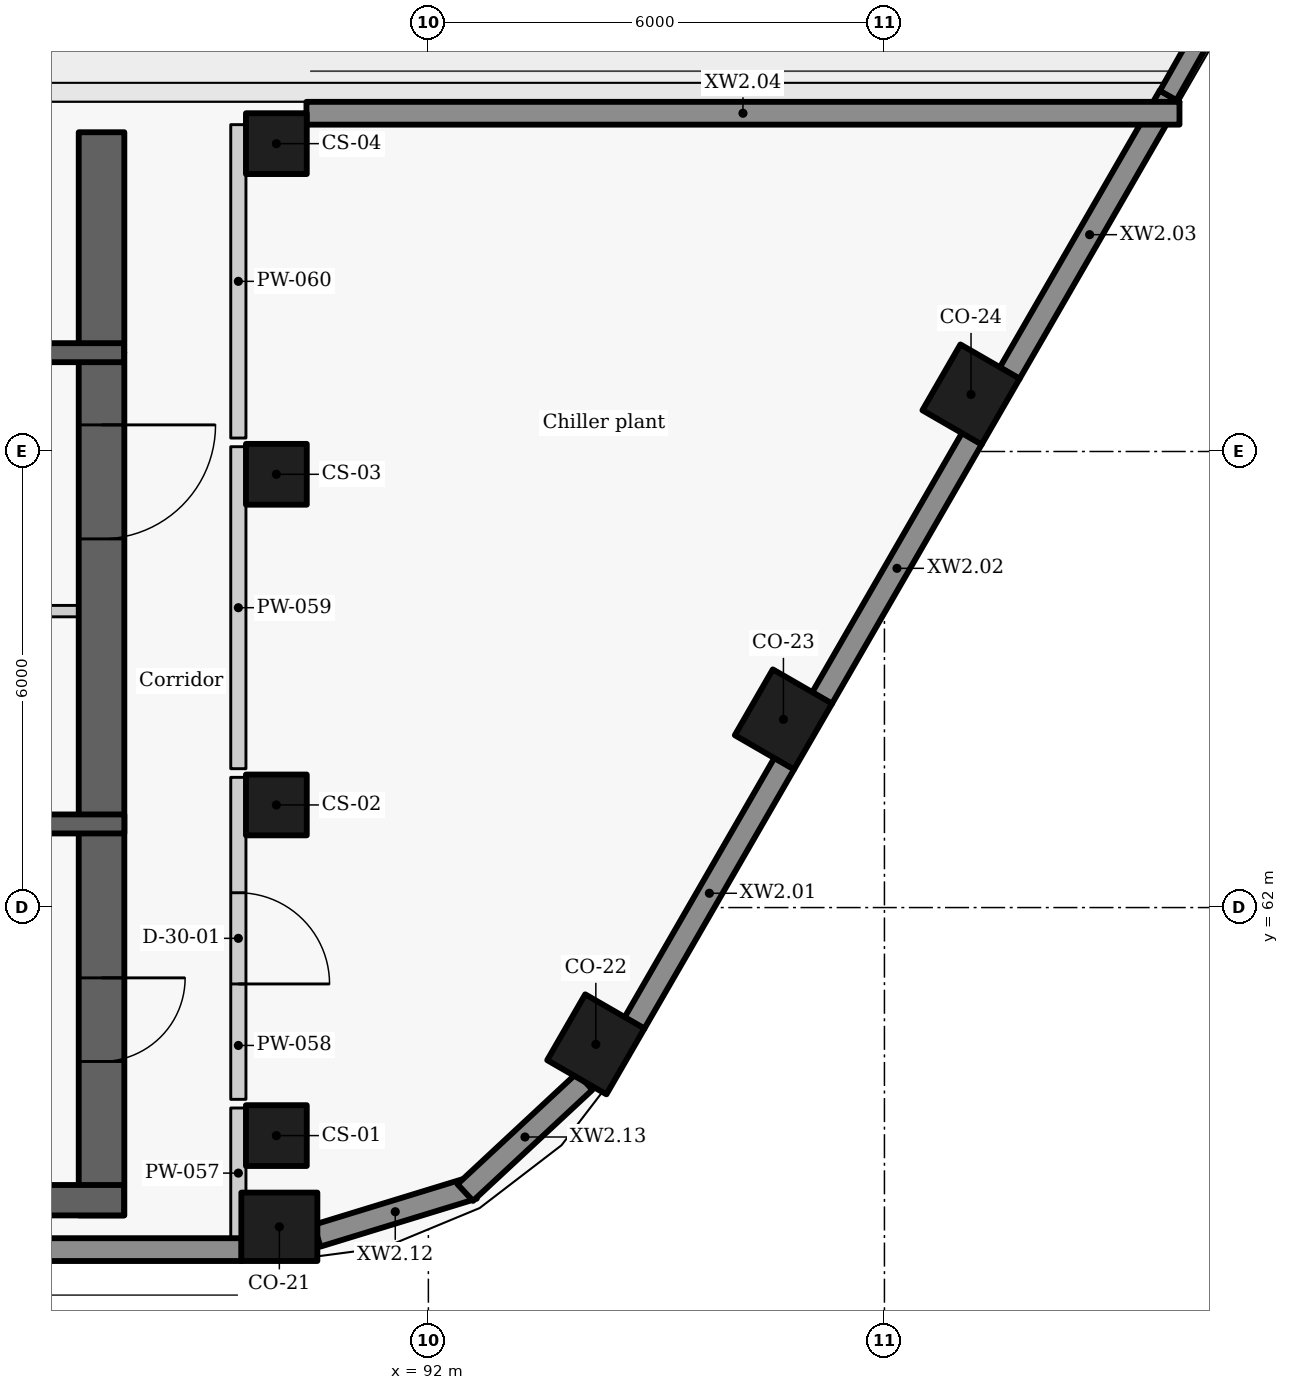
"""IFC4 building model, lengths in metres.
Left out: names, types, materials, properties, quantities, classifications, styles, units other than length and angle.
Written with IfcOpenShell. Run it as: python <this file> out.ifc"""

import sys

from ifc_helpers import new_model, si_unit, direction, frame, frame_2d, origin, origin_2d, place, context, subcontext, project, spatial, rectangle, extrude, element, fill, save


model = new_model("IFC4")
c1 = context("Model", 3, precision=1e-05, world=origin(), true_north=direction((0.0, 1.0)))
c2 = subcontext(c1, "Body", "Model", "MODEL_VIEW")
j1 = project(units=[si_unit("LENGTHUNIT", "METRE"), si_unit("PLANEANGLEUNIT", "RADIAN")], contexts=[c1])
p1 = place(None, origin())
s1 = spatial("IfcSite", under=j1, at=p1, CompositionType="ELEMENT")
p2 = place(p1, origin())
s2 = spatial("IfcBuilding", under=s1, at=p2, CompositionType="ELEMENT")
p3 = place(p2, frame((0.0, 0.0, 276.0)))
s3 = spatial("IfcBuildingStorey", under=s2, at=p3, CompositionType="ELEMENT", Elevation=276.0)
for number, where, z_axis, x_axis in (
    (1, (90.04, 57.8, 0.0), (0.0, 0.0, 1.0), (1.0, 0.0, 0.0)),
    (2, (94.203, 60.2, 0.0), (0.0, 0.0, 1.0), (0.5, 0.866, 0.0)),
    (3, (96.671, 64.475, 0.0), (0.0, 0.0, 1.0), (0.5, 0.866, 0.0)),
    (4, (99.139, 68.75, 0.0), (0.0, 0.0, 1.0), (0.5, 0.866, 0.0)),
):
    element("IfcColumn", number, at=place(p3, frame(where, z_axis=z_axis, x_axis=x_axis)), inside=s3, PredefinedType="COLUMN", context=c2, shape_type="SweptSolid", body=[
        extrude(rectangle(XDim=1.0, YDim=0.9, at=origin_2d()), origin(), (0.0, 0.0, 1.0), 3.6),
    ])
for number, where, z_axis, x_axis in (
    (5, (90.0, 59.0, 0.0), (0.0, 0.0, 1.0), (0.0, 1.0, 0.0)),
    (6, (90.0, 63.35, 0.0), (0.0, 0.0, 1.0), (0.0, 1.0, 0.0)),
    (7, (90.0, 67.7, 0.0), (0.0, 0.0, 1.0), (0.0, 1.0, 0.0)),
    (8, (90.0, 72.05, 0.0), (0.0, 0.0, 1.0), (0.0, 1.0, 0.0)),
):
    element("IfcColumn", number, at=place(p3, frame(where, z_axis=z_axis, x_axis=x_axis)), inside=s3, PredefinedType="COLUMN", context=c2, shape_type="SweptSolid", body=[
        extrude(rectangle(XDim=0.8, YDim=0.8, at=origin_2d()), origin(), (0.0, 0.0, 1.0), 3.6),
    ])
for number, where, z_axis, x_axis in (
    (9, (94.711, 60.48, 0.0), (0.0, 0.0, 1.0), (0.5, 0.866, 0.0)),
    (10, (97.179, 64.755, 0.0), (0.0, 0.0, 1.0), (0.5, 0.866, 0.0)),
):
    element("IfcWall", number, at=place(p3, frame(where, z_axis=z_axis, x_axis=x_axis)), inside=s3, PredefinedType="SOLIDWALL", context=c2, shape_type="SweptSolid", body=[
        extrude(rectangle(XDim=3.944, YDim=0.3, at=frame_2d((1.972, 0.0))), origin(), (0.0, 0.0, 1.0), 2.725),
    ])
p4 = place(p3, frame((99.647, 69.03, 0.0), z_axis=(0.0, 0.0, 1.0), x_axis=(0.499981865284, 0.866035873614, 0.0)))
e11 = element("IfcWall", 11, at=p4, inside=s3, PredefinedType="SOLIDWALL", context=c2, shape_type="SweptSolid", body=[
    extrude(rectangle(XDim=4.209, YDim=0.3, at=frame_2d((2.104, 0.0))), origin(), (0.0, 0.0, 1.0), 2.725),
])
p5 = place(p3, frame((101.882, 72.45, 0.0), z_axis=(0.0, 0.0, 1.0), x_axis=(-1.0, 0.0, 0.0)))
e12 = element("IfcWall", 12, at=p5, inside=s3, PredefinedType="SOLIDWALL", context=c2, shape_type="SweptSolid", body=[
    extrude(rectangle(XDim=11.486, YDim=0.3, at=frame_2d((5.743, 0.0))), origin(), (0.0, 0.0, 1.0), 2.725),
])
p6 = place(p3, frame((70.451, 57.5, 0.0), z_axis=(0.0, 0.0, 1.0), x_axis=(1.0, 0.0, 0.0)))
e13 = element("IfcWall", 13, at=p6, inside=s3, PredefinedType="SOLIDWALL", context=c2, shape_type="SweptSolid", body=[
    extrude(rectangle(XDim=19.093, YDim=0.3, at=frame_2d((9.546, 0.0))), origin(), (0.0, 0.0, 1.0), 2.725),
])
p7 = place(p3, frame((90.536, 57.683, 0.0), z_axis=(0.0, 0.0, 1.0), x_axis=(0.956094906027, 0.293057213987, 0.0)))
e14 = element("IfcWall", 14, at=p7, inside=s3, PredefinedType="SOLIDWALL", context=c2, shape_type="SweptSolid", body=[
    extrude(rectangle(XDim=2.152, YDim=0.3, at=frame_2d((1.076, 0.0))), origin(), (0.0, 0.0, 1.0), 2.725),
])
p8 = place(p3, frame((92.485, 58.25, 0.0), z_axis=(0.0, 0.0, 1.0), x_axis=(0.732075899412, 0.681223074697, 0.0)))
e15 = element("IfcWall", 15, at=p8, inside=s3, PredefinedType="SOLIDWALL", context=c2, shape_type="SweptSolid", body=[
    extrude(rectangle(XDim=2.146, YDim=0.3, at=frame_2d((1.073, 0.0))), origin(), (0.0, 0.0, 1.0), 2.725),
])
p9 = place(p3, frame((101.732, 72.684, 0.0), z_axis=(0.0, 0.0, 1.0), x_axis=(0.492736734633, 0.870178435922, 0.0)))
e16 = element("IfcWall", 16, at=p9, inside=s3, PredefinedType="PARAPET", context=c2, shape_type="SweptSolid", body=[
    extrude(rectangle(XDim=5.918, YDim=0.25, at=frame_2d((2.959, 0.0))), origin(), (0.0, 0.0, 1.0), 1.1),
])
p10 = place(p3, frame((88.0, 65.9, 0.0), z_axis=(0.0, 0.0, 1.0), x_axis=(-1.0, 0.0, 0.0)))
e17 = element("IfcWall", 17, at=p10, inside=s3, PredefinedType="PARTITIONING", context=c2, shape_type="SweptSolid", body=[
    extrude(rectangle(XDim=2.603, YDim=0.15, at=frame_2d((1.302, 0.0))), origin(), (0.0, 0.0, 1.0), 3.325),
])
p11 = place(p10, frame((1.175, 0.0, 0.0)))
e18 = element("IfcOpeningElement", 18, at=p11, cuts=e17, PredefinedType="OPENING", context=c2, shape_type="SweptSolid", body=[
    extrude(rectangle(XDim=0.9, YDim=2.1, at=frame_2d((0.45, 1.05))), frame((0.0, 0.085, 0.0), z_axis=(0.0, -1.0, 0.0), x_axis=(1.0, 0.0, 0.0)), (0.0, 0.0, 1.0), 0.17),
])
p12 = place(p3, frame((87.7, 69.3, -0.275), z_axis=(0.0, 0.0, 1.0), x_axis=(0.0, -1.0, 0.0)))
e19 = element("IfcWall", 19, at=p12, inside=s3, PredefinedType="SHEAR", context=c2, shape_type="SweptSolid", body=[
    extrude(rectangle(XDim=11.35, YDim=0.6, at=frame_2d((5.675, 0.0))), origin(), (0.0, 0.0, 1.0), 3.6),
])
p13 = place(p12, frame((0.95, 0.0, 0.275)))
e20 = element("IfcOpeningElement", 20, at=p13, cuts=e19, PredefinedType="OPENING", context=c2, shape_type="SweptSolid", body=[
    extrude(rectangle(XDim=1.5, YDim=2.1, at=frame_2d((0.75, 1.05))), frame((0.0, 0.31, 0.0), z_axis=(0.0, -1.0, 0.0), x_axis=(1.0, 0.0, 0.0)), (0.0, 0.0, 1.0), 0.62),
])
p14 = place(p12, frame((8.225, 0.0, 0.275)))
e21 = element("IfcOpeningElement", 21, at=p14, cuts=e19, PredefinedType="OPENING", context=c2, shape_type="SweptSolid", body=[
    extrude(rectangle(XDim=1.1, YDim=2.1, at=frame_2d((0.55, 1.05))), frame((0.0, 0.31, 0.0), z_axis=(0.0, -1.0, 0.0), x_axis=(1.0, 0.0, 0.0)), (0.0, 0.0, 1.0), 0.62),
])
p15 = place(p3, frame((80.547, 63.1, -0.275), z_axis=(0.0, 0.0, 1.0), x_axis=(1.0, 0.0, 0.0)))
e22 = element("IfcWall", 22, at=p15, inside=s3, PredefinedType="SHEAR", context=c2, shape_type="SweptSolid", body=[
    extrude(rectangle(XDim=7.453, YDim=0.25, at=frame_2d((3.727, 0.0))), origin(), (0.0, 0.0, 1.0), 3.6),
])
p16 = place(p15, frame((3.302, 0.0, 0.275)))
e23 = element("IfcOpeningElement", 23, at=p16, cuts=e22, PredefinedType="OPENING", context=c2, shape_type="SweptSolid", body=[
    extrude(rectangle(XDim=1.1, YDim=2.1, at=frame_2d((0.55, 1.05))), frame((0.0, 0.135, 0.0), z_axis=(0.0, -1.0, 0.0), x_axis=(1.0, 0.0, 0.0)), (0.0, 0.0, 1.0), 0.27),
])
p17 = place(p3, frame((89.5, 57.65, 0.0), z_axis=(0.0, 0.0, 1.0), x_axis=(0.0, 1.0, 0.0)))
e24 = element("IfcWall", 24, at=p17, inside=s3, PredefinedType="PARTITIONING", context=c2, shape_type="SweptSolid", body=[
    extrude(rectangle(XDim=1.713, YDim=0.2, at=frame_2d((0.856, 0.0))), origin(), (0.0, 0.0, 1.0), 3.325),
])
p18 = place(p3, frame((89.5, 63.713, 0.0), z_axis=(0.0, 0.0, 1.0), x_axis=(0.0, -1.0, 0.0)))
e25 = element("IfcWall", 25, at=p18, inside=s3, PredefinedType="PARTITIONING", context=c2, shape_type="SweptSolid", body=[
    extrude(rectangle(XDim=4.236, YDim=0.2, at=frame_2d((2.118, 0.0))), origin(), (0.0, 0.0, 1.0), 3.325),
])
p19 = place(p18, frame((1.518, 0.0, 0.0)))
e26 = element("IfcOpeningElement", 26, at=p19, cuts=e25, PredefinedType="OPENING", context=c2, shape_type="SweptSolid", body=[
    extrude(rectangle(XDim=1.2, YDim=2.1, at=frame_2d((0.6, 1.05))), frame((0.0, 0.11, 0.0), z_axis=(0.0, -1.0, 0.0), x_axis=(1.0, 0.0, 0.0)), (0.0, 0.0, 1.0), 0.22),
])
p20 = place(p3, frame((89.5, 63.827, 0.0), z_axis=(0.0, 0.0, 1.0), x_axis=(0.0, 1.0, 0.0)))
e27 = element("IfcWall", 27, at=p20, inside=s3, PredefinedType="PARTITIONING", context=c2, shape_type="SweptSolid", body=[
    extrude(rectangle(XDim=4.236, YDim=0.2, at=frame_2d((2.118, 0.0))), origin(), (0.0, 0.0, 1.0), 3.325),
])
p21 = place(p3, frame((89.5, 68.177, 0.0), z_axis=(0.0, 0.0, 1.0), x_axis=(0.0, 1.0, 0.0)))
e28 = element("IfcWall", 28, at=p21, inside=s3, PredefinedType="PARTITIONING", context=c2, shape_type="SweptSolid", body=[
    extrude(rectangle(XDim=4.123, YDim=0.2, at=frame_2d((2.062, 0.0))), origin(), (0.0, 0.0, 1.0), 3.325),
])
p22 = place(p3, frame((87.7, 69.304, -0.275), z_axis=(0.0, 0.0, 1.0), x_axis=(0.0, 1.0, 0.0)))
e29 = element("IfcWall", 29, at=p22, inside=s3, PredefinedType="SHEAR", context=c2, shape_type="SweptSolid", body=[
    extrude(rectangle(XDim=2.896, YDim=0.6, at=frame_2d((1.448, 0.0))), origin(), (0.0, 0.0, 1.0), 3.6),
])
p23 = place(p3, frame((85.404, 69.3, -0.275), z_axis=(0.0, 0.0, 1.0), x_axis=(1.0, 0.0, 0.0)))
e30 = element("IfcWall", 30, at=p23, inside=s3, PredefinedType="SHEAR", context=c2, shape_type="SweptSolid", body=[
    extrude(rectangle(XDim=2.592, YDim=0.25, at=frame_2d((1.296, 0.0))), origin(), (0.0, 0.0, 1.0), 3.6),
])
p24 = place(p3, frame((72.004, 58.15, -0.275), z_axis=(0.0, 0.0, 1.0), x_axis=(1.0, 0.0, 0.0)))
e31 = element("IfcWall", 31, at=p24, inside=s3, PredefinedType="SHEAR", context=c2, shape_type="SweptSolid", body=[
    extrude(rectangle(XDim=15.992, YDim=0.4, at=frame_2d((7.996, 0.0))), origin(), (0.0, 0.0, 1.0), 3.6),
])
p25 = place(p19, origin())
e32 = element("IfcDoor", 32, at=p25, inside=s3, OperationType="SINGLE_SWING_RIGHT", PredefinedType="DOOR", context=c2, shape_type="SweptSolid", body=[
    extrude(rectangle(XDim=1.2, YDim=2.1, at=frame_2d((0.6, 1.05))), frame((0.0, 0.025, 0.0), z_axis=(0.0, -1.0, 0.0), x_axis=(1.0, 0.0, 0.0)), (0.0, 0.0, 1.0), 0.05),
])
fill(e26, e32)
p26 = place(p13, origin())
e33 = element("IfcDoor", 33, at=p26, inside=s3, OperationType="DOUBLE_DOOR_SINGLE_SWING", PredefinedType="DOOR", context=c2, shape_type="SweptSolid", body=[
    extrude(rectangle(XDim=1.5, YDim=2.1, at=frame_2d((0.75, 1.05))), frame((0.0, 0.025, 0.0), z_axis=(0.0, -1.0, 0.0), x_axis=(1.0, 0.0, 0.0)), (0.0, 0.0, 1.0), 0.05),
])
fill(e20, e33)
p27 = place(p14, origin())
e34 = element("IfcDoor", 34, at=p27, inside=s3, OperationType="SINGLE_SWING_LEFT", PredefinedType="DOOR", context=c2, shape_type="SweptSolid", body=[
    extrude(rectangle(XDim=1.1, YDim=2.1, at=frame_2d((0.55, 1.05))), frame((0.0, 0.025, 0.0), z_axis=(0.0, -1.0, 0.0), x_axis=(1.0, 0.0, 0.0)), (0.0, 0.0, 1.0), 0.05),
])
fill(e21, e34)
save(model, sys.argv[1])
